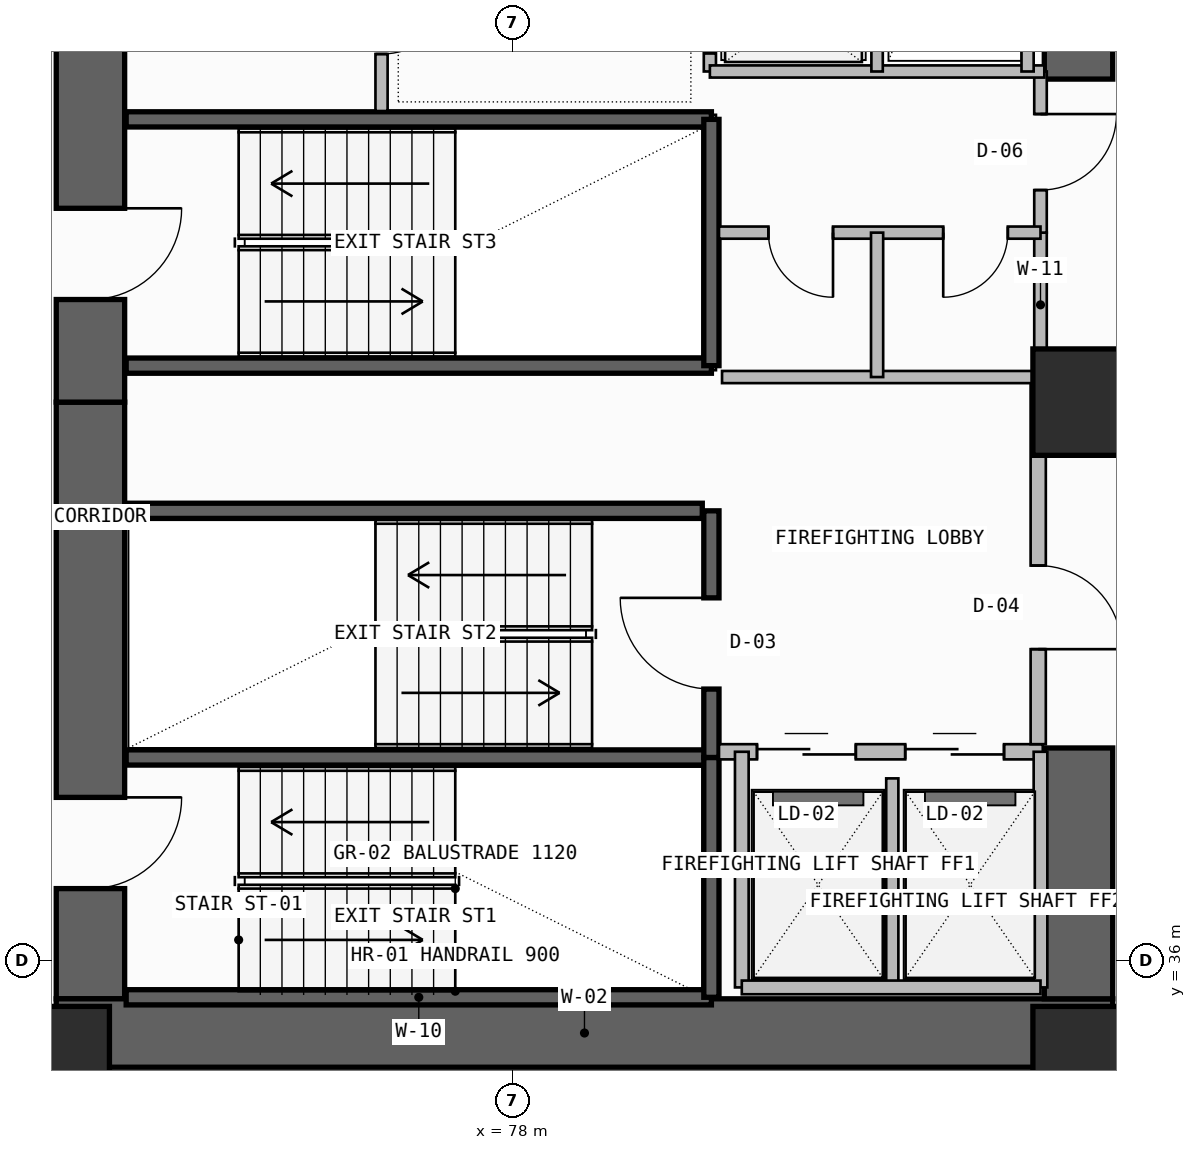
"""IFC4 building model, lengths in metres.
Left out: names, types, materials, properties, quantities, classifications, styles, units other than length and angle.
Written with IfcOpenShell. Run it as: python <this file> out.ifc"""

import sys

from ifc_helpers import new_model, si_unit, direction, frame, frame_2d, origin, origin_2d, place, context, subcontext, project, spatial, rectangle, extrude, element, fill, save


model = new_model("IFC4")
c1 = context("Model", 3, precision=1e-05, world=origin(), true_north=direction((0.0, 1.0)))
c2 = subcontext(c1, "Body", "Model", "MODEL_VIEW")
j1 = project(units=[si_unit("LENGTHUNIT", "METRE"), si_unit("PLANEANGLEUNIT", "RADIAN")], contexts=[c1])
p1 = place(None, origin())
s1 = spatial("IfcSite", under=j1, at=p1, CompositionType="ELEMENT")
p2 = place(p1, origin())
s2 = spatial("IfcBuilding", under=s1, at=p2, CompositionType="ELEMENT")
p3 = place(p2, frame((0.0, 0.0, 120.9)))
s3 = spatial("IfcBuildingStorey", under=s2, at=p3, CompositionType="ELEMENT", Elevation=120.9)
p4 = place(p3, frame((72.45, 35.5, -0.26), z_axis=(0.0, 0.0, 1.0), x_axis=(0.0, 1.0, 0.0)))
e1 = element("IfcWall", 1, at=p4, inside=s3, PredefinedType="SHEAR", context=c2, shape_type="SweptSolid", body=[
    extrude(rectangle(XDim=7.85, YDim=0.9, at=frame_2d((3.925, 0.0))), origin(), (0.0, 0.0, 1.0), 3.6),
])
p5 = place(p4, frame((1.45, 0.0, 0.26)))
e2 = element("IfcOpeningElement", 2, at=p5, cuts=e1, PredefinedType="OPENING", context=c2, shape_type="SweptSolid", body=[
    extrude(rectangle(XDim=1.2, YDim=2.2, at=frame_2d((0.6, 1.1))), frame((0.0, 0.46, 0.0), z_axis=(0.0, -1.0, 0.0), x_axis=(1.0, 0.0, 0.0)), (0.0, 0.0, 1.0), 0.92),
])
p6 = place(p3, frame((72.0, 35.05, -0.26), z_axis=(0.0, 0.0, 1.0), x_axis=(1.0, 0.0, 0.0)))
e3 = element("IfcWall", 3, at=p6, inside=s3, PredefinedType="SHEAR", context=c2, shape_type="SweptSolid", body=[
    extrude(rectangle(XDim=13.9, YDim=0.9, at=frame_2d((6.95, 0.0))), origin(), (0.0, 0.0, 1.0), 3.6),
])
p7 = place(p3, frame((85.45, 35.5, -0.26), z_axis=(0.0, 0.0, 1.0), x_axis=(0.0, 1.0, 0.0)))
e4 = element("IfcWall", 4, at=p7, inside=s3, PredefinedType="SHEAR", context=c2, shape_type="SweptSolid", body=[
    extrude(rectangle(XDim=3.3, YDim=0.9, at=frame_2d((1.65, 0.0))), origin(), (0.0, 0.0, 1.0), 3.6),
])
p8 = place(p3, frame((72.45, 43.35, -0.26), z_axis=(0.0, 0.0, 1.0), x_axis=(0.0, 1.0, 0.0)))
e5 = element("IfcWall", 5, at=p8, inside=s3, PredefinedType="SHEAR", context=c2, shape_type="SweptSolid", body=[
    extrude(rectangle(XDim=12.7, YDim=0.9, at=frame_2d((6.35, 0.0))), origin(), (0.0, 0.0, 1.0), 3.6),
])
p9 = place(p8, frame((1.35, 0.0, 0.26)))
e6 = element("IfcOpeningElement", 6, at=p9, cuts=e5, PredefinedType="OPENING", context=c2, shape_type="SweptSolid", body=[
    extrude(rectangle(XDim=1.2, YDim=2.2, at=frame_2d((0.6, 1.1))), frame((0.0, 0.46, 0.0), z_axis=(0.0, -1.0, 0.0), x_axis=(1.0, 0.0, 0.0)), (0.0, 0.0, 1.0), 0.92),
])
p10 = place(p3, frame((85.45, 47.6, -0.26), z_axis=(0.0, 0.0, 1.0), x_axis=(0.0, 1.0, 0.0)))
e7 = element("IfcWall", 7, at=p10, inside=s3, PredefinedType="SHEAR", context=c2, shape_type="SweptSolid", body=[
    extrude(rectangle(XDim=8.45, YDim=0.9, at=frame_2d((4.225, 0.0))), origin(), (0.0, 0.0, 1.0), 3.6),
])
for number, where, z_axis, x_axis in (
    (8, (72.0, 34.7, 0.0), (0.0, 0.0, 1.0), (1.0, 0.0, 0.0)),
    (9, (85.55, 34.7, 0.0), (0.0, 0.0, 1.0), (1.0, 0.0, 0.0)),
    (10, (85.55, 43.35, 0.0), (0.0, 0.0, 1.0), (1.0, 0.0, 0.0)),
):
    element("IfcColumn", number, at=place(p3, frame(where, z_axis=z_axis, x_axis=x_axis)), inside=s3, PredefinedType="COLUMN", context=c2, shape_type="SweptSolid", body=[
        extrude(rectangle(XDim=1.4, YDim=1.4, at=origin_2d()), origin(), (0.0, 0.0, 1.0), 3.6),
    ])
for number, where, z_axis, x_axis in (
    (11, (72.92, 35.52, -0.26), (0.0, 0.0, 1.0), (1.0, 0.0, 0.0)),
    (12, (72.92, 38.675, -0.26), (0.0, 0.0, 1.0), (1.0, 0.0, 0.0)),
):
    element("IfcWall", number, at=place(p3, frame(where, z_axis=z_axis, x_axis=x_axis)), inside=s3, PredefinedType="SOLIDWALL", context=c2, shape_type="SweptSolid", body=[
        extrude(rectangle(XDim=7.7, YDim=0.2, at=frame_2d((3.85, 0.0))), origin(), (0.0, 0.0, 1.0), 3.6),
    ])
p11 = place(p3, frame((80.62, 35.52, -0.26), z_axis=(0.0, 0.0, 1.0), x_axis=(0.0, 1.0, 0.0)))
e13 = element("IfcWall", 13, at=p11, inside=s3, PredefinedType="SOLIDWALL", context=c2, shape_type="SweptSolid", body=[
    extrude(rectangle(XDim=3.155, YDim=0.2, at=frame_2d((1.578, 0.0))), origin(), (0.0, 0.0, 1.0), 3.6),
])
p12 = place(p3, frame((80.62, 38.675, -0.26), z_axis=(0.0, 0.0, 1.0), x_axis=(0.0, 1.0, 0.0)))
e14 = element("IfcWall", 14, at=p12, inside=s3, PredefinedType="SOLIDWALL", context=c2, shape_type="SweptSolid", body=[
    extrude(rectangle(XDim=3.245, YDim=0.2, at=frame_2d((1.623, 0.0))), origin(), (0.0, 0.0, 1.0), 3.6),
])
p13 = place(p12, frame((0.9, 0.0, 0.26)))
e15 = element("IfcOpeningElement", 15, at=p13, cuts=e14, PredefinedType="OPENING", context=c2, shape_type="SweptSolid", body=[
    extrude(rectangle(XDim=1.2, YDim=2.2, at=frame_2d((0.6, 1.1))), frame((0.0, 0.11, 0.0), z_axis=(0.0, -1.0, 0.0), x_axis=(1.0, 0.0, 0.0)), (0.0, 0.0, 1.0), 0.22),
])
p14 = place(p3, frame((80.72, 38.75, 0.0), z_axis=(0.0, 0.0, 1.0), x_axis=(1.0, 0.0, 0.0)))
e16 = element("IfcWall", 16, at=p14, inside=s3, PredefinedType="SOLIDWALL", context=c2, shape_type="SweptSolid", body=[
    extrude(rectangle(XDim=4.26, YDim=0.2, at=frame_2d((2.13, 0.0))), origin(), (0.0, 0.0, 1.0), 3.34),
])
p15 = place(p14, frame((0.5, 0.0, 0.0)))
e17 = element("IfcOpeningElement", 17, at=p15, cuts=e16, PredefinedType="OPENING", context=c2, shape_type="SweptSolid", body=[
    extrude(rectangle(XDim=1.3, YDim=2.3, at=frame_2d((0.65, 1.15))), frame((0.0, 0.11, 0.0), z_axis=(0.0, -1.0, 0.0), x_axis=(1.0, 0.0, 0.0)), (0.0, 0.0, 1.0), 0.22),
])
p16 = place(p14, frame((2.45, 0.0, 0.0)))
e18 = element("IfcOpeningElement", 18, at=p16, cuts=e16, PredefinedType="OPENING", context=c2, shape_type="SweptSolid", body=[
    extrude(rectangle(XDim=1.3, YDim=2.3, at=frame_2d((0.65, 1.15))), frame((0.0, 0.11, 0.0), z_axis=(0.0, -1.0, 0.0), x_axis=(1.0, 0.0, 0.0)), (0.0, 0.0, 1.0), 0.22),
])
p17 = place(p3, frame((83.0, 35.65, 0.0), z_axis=(0.0, 0.0, 1.0), x_axis=(0.0, 1.0, 0.0)))
e19 = element("IfcWall", 19, at=p17, inside=s3, PredefinedType="PLUMBINGWALL", context=c2, shape_type="SweptSolid", body=[
    extrude(rectangle(XDim=2.75, YDim=0.16, at=frame_2d((1.375, 0.0))), origin(), (0.0, 0.0, 1.0), 3.34),
])
for number, where, z_axis, x_axis in (
    (20, (84.95, 35.65, 0.0), (0.0, 0.0, 1.0), (0.0, 1.0, 0.0)),
    (21, (81.02, 35.65, 0.0), (0.0, 0.0, 1.0), (0.0, 1.0, 0.0)),
):
    element("IfcWall", number, at=place(p3, frame(where, z_axis=z_axis, x_axis=x_axis)), inside=s3, PredefinedType="SOLIDWALL", context=c2, shape_type="SweptSolid", body=[
        extrude(rectangle(XDim=3.1, YDim=0.18, at=frame_2d((1.55, 0.0))), origin(), (0.0, 0.0, 1.0), 3.34),
    ])
p18 = place(p3, frame((81.02, 35.65, 0.0), z_axis=(0.0, 0.0, 1.0), x_axis=(1.0, 0.0, 0.0)))
e22 = element("IfcWall", 22, at=p18, inside=s3, PredefinedType="SOLIDWALL", context=c2, shape_type="SweptSolid", body=[
    extrude(rectangle(XDim=3.93, YDim=0.18, at=frame_2d((1.965, 0.0))), origin(), (0.0, 0.0, 1.0), 3.34),
])
p19 = place(p3, frame((84.92, 38.85, 0.0), z_axis=(0.0, 0.0, 1.0), x_axis=(0.0, 1.0, 0.0)))
e23 = element("IfcWall", 23, at=p19, inside=s3, PredefinedType="SOLIDWALL", context=c2, shape_type="SweptSolid", body=[
    extrude(rectangle(XDim=4.83, YDim=0.2, at=frame_2d((2.415, 0.0))), origin(), (0.0, 0.0, 1.0), 3.34),
])
p20 = place(p19, frame((1.25, 0.0, 0.0)))
e24 = element("IfcOpeningElement", 24, at=p20, cuts=e23, PredefinedType="OPENING", context=c2, shape_type="SweptSolid", body=[
    extrude(rectangle(XDim=1.1, YDim=2.2, at=frame_2d((0.55, 1.1))), frame((0.0, 0.11, 0.0), z_axis=(0.0, -1.0, 0.0), x_axis=(1.0, 0.0, 0.0)), (0.0, 0.0, 1.0), 0.22),
])
p21 = place(p3, frame((72.92, 41.92, -0.26), z_axis=(0.0, 0.0, 1.0), x_axis=(1.0, 0.0, 0.0)))
e25 = element("IfcWall", 25, at=p21, inside=s3, PredefinedType="SOLIDWALL", context=c2, shape_type="SweptSolid", body=[
    extrude(rectangle(XDim=7.58, YDim=0.2, at=frame_2d((3.79, 0.0))), origin(), (0.0, 0.0, 1.0), 3.6),
])
for number, where, z_axis, x_axis in (
    (26, (72.92, 43.83, -0.26), (0.0, 0.0, 1.0), (1.0, 0.0, 0.0)),
    (27, (72.92, 47.07, -0.26), (0.0, 0.0, 1.0), (1.0, 0.0, 0.0)),
):
    element("IfcWall", number, at=place(p3, frame(where, z_axis=z_axis, x_axis=x_axis)), inside=s3, PredefinedType="SOLIDWALL", context=c2, shape_type="SweptSolid", body=[
        extrude(rectangle(XDim=7.7, YDim=0.2, at=frame_2d((3.85, 0.0))), origin(), (0.0, 0.0, 1.0), 3.6),
    ])
p22 = place(p3, frame((80.62, 43.83, -0.26), z_axis=(0.0, 0.0, 1.0), x_axis=(0.0, 1.0, 0.0)))
e28 = element("IfcWall", 28, at=p22, inside=s3, PredefinedType="SOLIDWALL", context=c2, shape_type="SweptSolid", body=[
    extrude(rectangle(XDim=3.24, YDim=0.2, at=frame_2d((1.62, 0.0))), origin(), (0.0, 0.0, 1.0), 3.6),
])
p23 = place(p3, frame((84.95, 43.68, 0.0), z_axis=(0.0, 0.0, 1.0), x_axis=(0.0, 1.0, 0.0)))
e29 = element("IfcWall", 29, at=p23, inside=s3, PredefinedType="PLUMBINGWALL", context=c2, shape_type="SweptSolid", body=[
    extrude(rectangle(XDim=1.9, YDim=0.165, at=frame_2d((0.95, 0.0))), origin(), (0.0, 0.0, 1.0), 3.34),
])
p24 = place(p3, frame((84.95, 45.58, 0.0), z_axis=(0.0, 0.0, 1.0), x_axis=(0.0, 1.0, 0.0)))
e30 = element("IfcWall", 30, at=p24, inside=s3, PredefinedType="PARTITIONING", context=c2, shape_type="SweptSolid", body=[
    extrude(rectangle(XDim=2.12, YDim=0.165, at=frame_2d((1.06, 0.0))), origin(), (0.0, 0.0, 1.0), 3.34),
])
p25 = place(p24, frame((0.56, 0.0, 0.0)))
e31 = element("IfcOpeningElement", 31, at=p25, cuts=e30, PredefinedType="OPENING", context=c2, shape_type="SweptSolid", body=[
    extrude(rectangle(XDim=1.0, YDim=2.2, at=frame_2d((0.5, 1.1))), frame((0.0, 0.093, 0.0), z_axis=(0.0, -1.0, 0.0), x_axis=(1.0, 0.0, 0.0)), (0.0, 0.0, 1.0), 0.185),
])
p26 = place(p3, frame((80.72, 45.58, 0.0), z_axis=(0.0, 0.0, 1.0), x_axis=(1.0, 0.0, 0.0)))
e32 = element("IfcWall", 32, at=p26, inside=s3, PredefinedType="PLUMBINGWALL", context=c2, shape_type="SweptSolid", body=[
    extrude(rectangle(XDim=4.23, YDim=0.16, at=frame_2d((2.115, 0.0))), origin(), (0.0, 0.0, 1.0), 3.34),
])
p27 = place(p26, frame((0.65, 0.0, 0.0)))
e33 = element("IfcOpeningElement", 33, at=p27, cuts=e32, PredefinedType="OPENING", context=c2, shape_type="SweptSolid", body=[
    extrude(rectangle(XDim=0.85, YDim=2.05, at=frame_2d((0.425, 1.025))), frame((0.0, 0.09, 0.0), z_axis=(0.0, -1.0, 0.0), x_axis=(1.0, 0.0, 0.0)), (0.0, 0.0, 1.0), 0.18),
])
p28 = place(p26, frame((2.95, 0.0, 0.0)))
e34 = element("IfcOpeningElement", 34, at=p28, cuts=e32, PredefinedType="OPENING", context=c2, shape_type="SweptSolid", body=[
    extrude(rectangle(XDim=0.85, YDim=2.05, at=frame_2d((0.425, 1.025))), frame((0.0, 0.09, 0.0), z_axis=(0.0, -1.0, 0.0), x_axis=(1.0, 0.0, 0.0)), (0.0, 0.0, 1.0), 0.18),
])
p29 = place(p3, frame((80.76, 43.68, 0.0), z_axis=(0.0, 0.0, 1.0), x_axis=(1.0, 0.0, 0.0)))
e35 = element("IfcWall", 35, at=p29, inside=s3, PredefinedType="PLUMBINGWALL", context=c2, shape_type="SweptSolid", body=[
    extrude(rectangle(XDim=4.19, YDim=0.16, at=frame_2d((2.095, 0.0))), origin(), (0.0, 0.0, 1.0), 3.34),
])
p30 = place(p3, frame((82.8, 43.68, 0.0), z_axis=(0.0, 0.0, 1.0), x_axis=(0.0, 1.0, 0.0)))
e36 = element("IfcWall", 36, at=p30, inside=s3, PredefinedType="PLUMBINGWALL", context=c2, shape_type="SweptSolid", body=[
    extrude(rectangle(XDim=1.9, YDim=0.16, at=frame_2d((0.95, 0.0))), origin(), (0.0, 0.0, 1.0), 3.34),
])
p31 = place(p3, frame((76.28, 47.18, 0.0), z_axis=(0.0, 0.0, 1.0), x_axis=(0.0, 1.0, 0.0)))
e37 = element("IfcWall", 37, at=p31, inside=s3, PredefinedType="SOLIDWALL", context=c2, shape_type="SweptSolid", body=[
    extrude(rectangle(XDim=5.14, YDim=0.16, at=frame_2d((2.57, 0.0))), origin(), (0.0, 0.0, 1.0), 3.34),
])
p32 = place(p31, frame((0.75, 0.0, 0.0)))
e38 = element("IfcOpeningElement", 38, at=p32, cuts=e37, PredefinedType="OPENING", context=c2, shape_type="SweptSolid", body=[
    extrude(rectangle(XDim=1.0, YDim=2.2, at=frame_2d((0.5, 1.1))), frame((0.0, 0.09, 0.0), z_axis=(0.0, -1.0, 0.0), x_axis=(1.0, 0.0, 0.0)), (0.0, 0.0, 1.0), 0.18),
])
p33 = place(p31, frame((3.2, 0.0, 0.0)))
e39 = element("IfcOpeningElement", 39, at=p33, cuts=e37, PredefinedType="OPENING", context=c2, shape_type="SweptSolid", body=[
    extrude(rectangle(XDim=0.9, YDim=2.1, at=frame_2d((0.45, 1.05))), frame((0.0, 0.09, 0.0), z_axis=(0.0, -1.0, 0.0), x_axis=(1.0, 0.0, 0.0)), (0.0, 0.0, 1.0), 0.18),
])
p34 = place(p3, frame((80.6, 47.7, 0.0), z_axis=(0.0, 0.0, 1.0), x_axis=(0.0, 1.0, 0.0)))
e40 = element("IfcWall", 40, at=p34, inside=s3, PredefinedType="SOLIDWALL", context=c2, shape_type="SweptSolid", body=[
    extrude(rectangle(XDim=4.6, YDim=0.16, at=frame_2d((2.3, 0.0))), origin(), (0.0, 0.0, 1.0), 3.34),
])
p35 = place(p34, frame((0.24, 0.0, 0.0)))
e41 = element("IfcOpeningElement", 41, at=p35, cuts=e40, PredefinedType="OPENING", context=c2, shape_type="SweptSolid", body=[
    extrude(rectangle(XDim=1.1, YDim=2.25, at=frame_2d((0.55, 1.125))), frame((0.0, 0.09, 0.0), z_axis=(0.0, -1.0, 0.0), x_axis=(1.0, 0.0, 0.0)), (0.0, 0.0, 1.0), 0.18),
])
p36 = place(p34, frame((1.76, 0.0, 0.0)))
e42 = element("IfcOpeningElement", 42, at=p36, cuts=e40, PredefinedType="OPENING", context=c2, shape_type="SweptSolid", body=[
    extrude(rectangle(XDim=1.1, YDim=2.25, at=frame_2d((0.55, 1.125))), frame((0.0, 0.09, 0.0), z_axis=(0.0, -1.0, 0.0), x_axis=(1.0, 0.0, 0.0)), (0.0, 0.0, 1.0), 0.18),
])
p37 = place(p34, frame((3.28, 0.0, 0.0)))
e43 = element("IfcOpeningElement", 43, at=p37, cuts=e40, PredefinedType="OPENING", context=c2, shape_type="SweptSolid", body=[
    extrude(rectangle(XDim=1.1, YDim=2.25, at=frame_2d((0.55, 1.125))), frame((0.0, 0.09, 0.0), z_axis=(0.0, -1.0, 0.0), x_axis=(1.0, 0.0, 0.0)), (0.0, 0.0, 1.0), 0.18),
])
p38 = place(p3, frame((80.6, 47.7, 0.0), z_axis=(0.0, 0.0, 1.0), x_axis=(1.0, 0.0, 0.0)))
e44 = element("IfcWall", 44, at=p38, inside=s3, PredefinedType="SOLIDWALL", context=c2, shape_type="SweptSolid", body=[
    extrude(rectangle(XDim=4.4, YDim=0.16, at=frame_2d((2.2, 0.0))), origin(), (0.0, 0.0, 1.0), 3.34),
])
p39 = place(p3, frame((82.8, 47.7, 0.0), z_axis=(0.0, 0.0, 1.0), x_axis=(0.0, 1.0, 0.0)))
e45 = element("IfcWall", 45, at=p39, inside=s3, PredefinedType="PLUMBINGWALL", context=c2, shape_type="SweptSolid", body=[
    extrude(rectangle(XDim=4.6, YDim=0.15, at=frame_2d((2.3, 0.0))), origin(), (0.0, 0.0, 1.0), 3.34),
])
p40 = place(p3, frame((84.78, 47.7, 0.0), z_axis=(0.0, 0.0, 1.0), x_axis=(0.0, 1.0, 0.0)))
e46 = element("IfcWall", 46, at=p40, inside=s3, PredefinedType="SOLIDWALL", context=c2, shape_type="SweptSolid", body=[
    extrude(rectangle(XDim=4.6, YDim=0.16, at=frame_2d((2.3, 0.0))), origin(), (0.0, 0.0, 1.0), 3.34),
])
p41 = place(p5, frame((1.2, 0.0, 0.0), z_axis=(0.0, 0.0, 1.0), x_axis=(-1.0, 0.0, 0.0)))
e47 = element("IfcDoor", 47, at=p41, inside=s3, OperationType="SINGLE_SWING_LEFT", PredefinedType="USERDEFINED", context=c2, shape_type="SweptSolid", body=[
    extrude(rectangle(XDim=1.2, YDim=2.2, at=frame_2d((0.6, 1.1))), frame((0.0, 0.025, 0.0), z_axis=(0.0, -1.0, 0.0), x_axis=(1.0, 0.0, 0.0)), (0.0, 0.0, 1.0), 0.05),
])
fill(e2, e47)
p42 = place(p13, origin())
e48 = element("IfcDoor", 48, at=p42, inside=s3, OperationType="SINGLE_SWING_RIGHT", PredefinedType="USERDEFINED", context=c2, shape_type="SweptSolid", body=[
    extrude(rectangle(XDim=1.2, YDim=2.2, at=frame_2d((0.6, 1.1))), frame((0.0, 0.025, 0.0), z_axis=(0.0, -1.0, 0.0), x_axis=(1.0, 0.0, 0.0)), (0.0, 0.0, 1.0), 0.05),
])
fill(e15, e48)
p43 = place(p15, origin())
e49 = element("IfcDoor", 49, at=p43, inside=s3, OperationType="DOUBLE_DOOR_SLIDING", PredefinedType="DOOR", context=c2, shape_type="SweptSolid", body=[
    extrude(rectangle(XDim=1.3, YDim=2.3, at=frame_2d((0.65, 1.15))), frame((0.0, 0.025, 0.0), z_axis=(0.0, -1.0, 0.0), x_axis=(1.0, 0.0, 0.0)), (0.0, 0.0, 1.0), 0.05),
])
fill(e17, e49)
p44 = place(p16, origin())
e50 = element("IfcDoor", 50, at=p44, inside=s3, OperationType="DOUBLE_DOOR_SLIDING", PredefinedType="DOOR", context=c2, shape_type="SweptSolid", body=[
    extrude(rectangle(XDim=1.3, YDim=2.3, at=frame_2d((0.65, 1.15))), frame((0.0, 0.025, 0.0), z_axis=(0.0, -1.0, 0.0), x_axis=(1.0, 0.0, 0.0)), (0.0, 0.0, 1.0), 0.05),
])
fill(e18, e50)
p45 = place(p20, frame((1.1, 0.0, 0.0), z_axis=(0.0, 0.0, 1.0), x_axis=(-1.0, 0.0, 0.0)))
e51 = element("IfcDoor", 51, at=p45, inside=s3, OperationType="SINGLE_SWING_RIGHT", PredefinedType="DOOR", context=c2, shape_type="SweptSolid", body=[
    extrude(rectangle(XDim=1.1, YDim=2.2, at=frame_2d((0.55, 1.1))), frame((0.0, 0.025, 0.0), z_axis=(0.0, -1.0, 0.0), x_axis=(1.0, 0.0, 0.0)), (0.0, 0.0, 1.0), 0.05),
])
fill(e24, e51)
p46 = place(p9, frame((1.2, 0.0, 0.0), z_axis=(0.0, 0.0, 1.0), x_axis=(-1.0, 0.0, 0.0)))
e52 = element("IfcDoor", 52, at=p46, inside=s3, OperationType="SINGLE_SWING_LEFT", PredefinedType="USERDEFINED", context=c2, shape_type="SweptSolid", body=[
    extrude(rectangle(XDim=1.2, YDim=2.2, at=frame_2d((0.6, 1.1))), frame((0.0, 0.025, 0.0), z_axis=(0.0, -1.0, 0.0), x_axis=(1.0, 0.0, 0.0)), (0.0, 0.0, 1.0), 0.05),
])
fill(e6, e52)
p47 = place(p25, frame((1.0, 0.0, 0.0), z_axis=(0.0, 0.0, 1.0), x_axis=(-1.0, 0.0, 0.0)))
e53 = element("IfcDoor", 53, at=p47, inside=s3, OperationType="SINGLE_SWING_LEFT", PredefinedType="DOOR", context=c2, shape_type="SweptSolid", body=[
    extrude(rectangle(XDim=1.0, YDim=2.2, at=frame_2d((0.5, 1.1))), frame((0.0, 0.025, 0.0), z_axis=(0.0, -1.0, 0.0), x_axis=(1.0, 0.0, 0.0)), (0.0, 0.0, 1.0), 0.05),
])
fill(e31, e53)
p48 = place(p27, frame((0.85, 0.0, 0.0), z_axis=(0.0, 0.0, 1.0), x_axis=(-1.0, 0.0, 0.0)))
e54 = element("IfcDoor", 54, at=p48, inside=s3, OperationType="SINGLE_SWING_LEFT", PredefinedType="DOOR", context=c2, shape_type="SweptSolid", body=[
    extrude(rectangle(XDim=0.85, YDim=2.05, at=frame_2d((0.425, 1.025))), frame((0.0, 0.025, 0.0), z_axis=(0.0, -1.0, 0.0), x_axis=(1.0, 0.0, 0.0)), (0.0, 0.0, 1.0), 0.05),
])
fill(e33, e54)
p49 = place(p28, frame((0.85, 0.0, 0.0), z_axis=(0.0, 0.0, 1.0), x_axis=(-1.0, 0.0, 0.0)))
e55 = element("IfcDoor", 55, at=p49, inside=s3, OperationType="SINGLE_SWING_RIGHT", PredefinedType="DOOR", context=c2, shape_type="SweptSolid", body=[
    extrude(rectangle(XDim=0.85, YDim=2.05, at=frame_2d((0.425, 1.025))), frame((0.0, 0.025, 0.0), z_axis=(0.0, -1.0, 0.0), x_axis=(1.0, 0.0, 0.0)), (0.0, 0.0, 1.0), 0.05),
])
fill(e34, e55)
p50 = place(p32, frame((1.0, 0.0, 0.0), z_axis=(0.0, 0.0, 1.0), x_axis=(-1.0, 0.0, 0.0)))
e56 = element("IfcDoor", 56, at=p50, inside=s3, OperationType="SINGLE_SWING_LEFT", PredefinedType="DOOR", context=c2, shape_type="SweptSolid", body=[
    extrude(rectangle(XDim=1.0, YDim=2.2, at=frame_2d((0.5, 1.1))), frame((0.0, 0.025, 0.0), z_axis=(0.0, -1.0, 0.0), x_axis=(1.0, 0.0, 0.0)), (0.0, 0.0, 1.0), 0.05),
])
fill(e38, e56)
p51 = place(p35, frame((1.1, 0.0, 0.0), z_axis=(0.0, 0.0, 1.0), x_axis=(-1.0, 0.0, 0.0)))
e57 = element("IfcDoor", 57, at=p51, inside=s3, OperationType="DOUBLE_DOOR_SLIDING", PredefinedType="DOOR", context=c2, shape_type="SweptSolid", body=[
    extrude(rectangle(XDim=1.1, YDim=2.25, at=frame_2d((0.55, 1.125))), frame((0.0, 0.025, 0.0), z_axis=(0.0, -1.0, 0.0), x_axis=(1.0, 0.0, 0.0)), (0.0, 0.0, 1.0), 0.05),
])
fill(e41, e57)
save(model, sys.argv[1])
